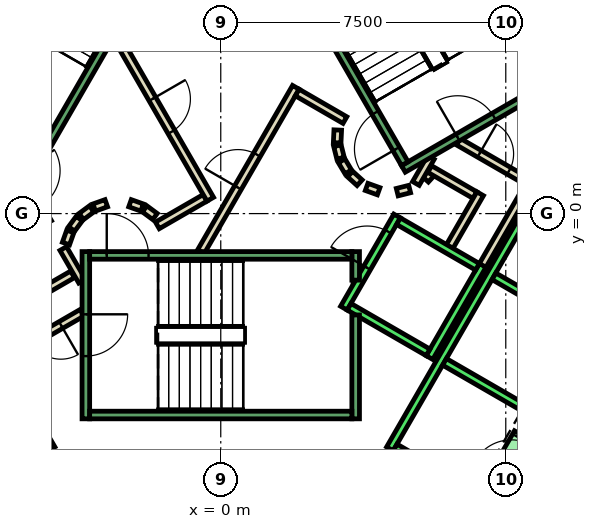
"""IFC4 building model, lengths in metres.
Left out: names, types, materials, properties, quantities, classifications, styles, units other than length and angle.
Written with IfcOpenShell. Run it as: python <this file> out.ifc"""

import sys

from ifc_helpers import new_model, si_unit, direction, frame, frame_2d, origin, place, context, subcontext, project, spatial, polyline, rectangle, outline, extrude, element, fill, save


model = new_model("IFC4")
c1 = context("Model", 3, precision=1e-05, world=origin(), true_north=direction((0.0, 1.0)))
c2 = subcontext(c1, "Body", "Model", "MODEL_VIEW")
j1 = project(units=[si_unit("LENGTHUNIT", "METRE"), si_unit("PLANEANGLEUNIT", "RADIAN")], contexts=[c1])
p1 = place(None, origin())
s1 = spatial("IfcSite", under=j1, at=p1, CompositionType="ELEMENT")
p2 = place(p1, origin())
s2 = spatial("IfcBuilding", under=s1, at=p2, CompositionType="ELEMENT")
p3 = place(p2, frame((0.0, 0.0, 9.0)))
s3 = spatial("IfcBuildingStorey", under=s2, at=p3, CompositionType="ELEMENT", Elevation=9.0)
p4 = place(p3, frame((0.0, 0.0, -0.45)))
e1 = element("IfcWall", 1, at=p4, inside=s3, PredefinedType="SHEAR", context=c2, shape_type="SweptSolid", body=[
    extrude(outline(polyline([(8.517, 11.748), (7.651, 11.248), (12.702, 2.5), (13.856, 2.5), (8.517, 11.748)])), origin(), (0.0, 0.0, 1.0), 6.0),
])
p5 = place(p3, frame((0.0, 0.0, 3.6)))
e2 = element("IfcWall", 2, at=p5, inside=s3, PredefinedType="SHEAR", context=c2, shape_type="SweptSolid", body=[
    extrude(outline(polyline([(8.767, -6.314), (7.902, -5.814), (7.252, -6.94), (8.117, -7.44), (8.767, -6.314)])), origin(), (0.0, 0.0, 1.0), 1.95),
])
p6 = place(p3, frame((5.39, 0.898, 0.0), z_axis=(0.0, 0.0, 1.0), x_axis=(0.673828488714, 0.738887791073, 0.0)))
e3 = element("IfcWall", 3, at=p6, inside=s3, PredefinedType="PARTITIONING", context=c2, shape_type="SweptSolid", body=[
    extrude(rectangle(XDim=0.263, YDim=0.2, at=frame_2d((0.131, 0.0))), origin(), (0.0, 0.0, 1.0), 5.55),
])
p7 = place(p3, frame((5.499, 1.172, 0.0), z_axis=(0.0, 0.0, 1.0), x_axis=(0.866333505267, -0.499465972466, 0.0)))
e4 = element("IfcWall", 4, at=p7, inside=s3, PredefinedType="PARTITIONING", context=c2, shape_type="SweptSolid", body=[
    extrude(rectangle(XDim=1.374, YDim=0.2, at=frame_2d((0.687, 0.0))), origin(), (0.0, 0.0, 1.0), 5.55),
])
p8 = place(p3, frame((6.826, 0.522, 0.0), z_axis=(0.0, 0.0, 1.0), x_axis=(-0.500016722714, -0.866015748706, 0.0)))
e5 = element("IfcWall", 5, at=p8, inside=s3, PredefinedType="PARTITIONING", context=c2, shape_type="SweptSolid", body=[
    extrude(rectangle(XDim=1.7, YDim=0.2, at=frame_2d((0.85, 0.0))), origin(), (0.0, 0.0, 1.0), 5.55),
])
p9 = place(p3, frame((8.192, 0.888, 0.0), z_axis=(0.0, 0.0, 1.0), x_axis=(-0.499940625693, -0.866059680843, 0.0)))
e6 = element("IfcWall", 6, at=p9, inside=s3, PredefinedType="PARTITIONING", context=c2, shape_type="SweptSolid", body=[
    extrude(rectangle(XDim=2.68, YDim=0.2, at=frame_2d((1.34, 0.0))), origin(), (0.0, 0.0, 1.0), 5.55),
])
p10 = place(p3, frame((5.135, 0.793, 0.0), z_axis=(0.0, 0.0, 1.0), x_axis=(0.499526442893, 0.866298639529, 0.0)))
e7 = element("IfcWall", 7, at=p10, inside=s3, PredefinedType="PARTITIONING", context=c2, shape_type="SweptSolid", body=[
    extrude(rectangle(XDim=0.791, YDim=0.2, at=frame_2d((0.396, 0.0))), origin(), (0.0, 0.0, 1.0), 5.55),
])
p11 = place(p3, frame((6.25, 1.894, 0.0), z_axis=(0.0, 0.0, 1.0), x_axis=(0.866043184279, -0.499969202016, 0.0)))
e8 = element("IfcWall", 8, at=p11, inside=s3, PredefinedType="PARTITIONING", context=c2, shape_type="SweptSolid", body=[
    extrude(rectangle(XDim=2.084, YDim=0.2, at=frame_2d((1.042, 0.0))), origin(), (0.0, 0.0, 1.0), 5.55),
])
p12 = place(p11, frame((0.642, 0.0, 0.0)))
e9 = element("IfcOpeningElement", 9, at=p12, cuts=e8, PredefinedType="OPENING", context=c2, shape_type="SweptSolid", body=[
    extrude(rectangle(XDim=0.9, YDim=2.1, at=frame_2d((0.45, 1.05))), frame((0.0, 0.11, 0.0), z_axis=(0.0, -1.0, 0.0), x_axis=(1.0, 0.0, 0.0)), (0.0, 0.0, 1.0), 0.22),
])
p13 = place(p3, frame((-3.9, -1.599, 0.0), z_axis=(0.0, 0.0, 1.0), x_axis=(-0.865969445389, -0.500096910261, 0.0)))
e10 = element("IfcWall", 10, at=p13, inside=s3, PredefinedType="PARTITIONING", context=c2, shape_type="SweptSolid", body=[
    extrude(rectangle(XDim=1.373, YDim=0.2, at=frame_2d((0.687, 0.0))), origin(), (0.0, 0.0, 1.0), 5.55),
])
p14 = place(p3, frame((-4.145, -0.92, 0.0), z_axis=(0.0, 0.0, 1.0), x_axis=(0.499743786207, -0.866173278362, 0.0)))
e11 = element("IfcWall", 11, at=p14, inside=s3, PredefinedType="PARTITIONING", context=c2, shape_type="SweptSolid", body=[
    extrude(rectangle(XDim=0.991, YDim=0.2, at=frame_2d((0.495, 0.0))), origin(), (0.0, 0.0, 1.0), 5.55),
])
p15 = place(p3, frame((-3.65, -2.61, 0.0), z_axis=(0.0, 0.0, 1.0), x_axis=(-0.866072462134, -0.499918483688, 0.0)))
e12 = element("IfcWall", 12, at=p15, inside=s3, PredefinedType="PARTITIONING", context=c2, shape_type="SweptSolid", body=[
    extrude(rectangle(XDim=2.084, YDim=0.2, at=frame_2d((1.042, 0.0))), origin(), (0.0, 0.0, 1.0), 5.55),
])
p16 = place(p15, frame((0.642, 0.0, 0.0)))
e13 = element("IfcOpeningElement", 13, at=p16, cuts=e12, PredefinedType="OPENING", context=c2, shape_type="SweptSolid", body=[
    extrude(rectangle(XDim=0.9, YDim=2.1, at=frame_2d((0.45, 1.05))), frame((0.0, 0.11, 0.0), z_axis=(0.0, -1.0, 0.0), x_axis=(1.0, 0.0, 0.0)), (0.0, 0.0, 1.0), 0.22),
])
p17 = place(p3, frame((3.079, 2.199, 0.0), z_axis=(0.0, 0.0, 1.0), x_axis=(-0.047771483479, -0.998858290933, 0.0)))
e14 = element("IfcWall", 14, at=p17, inside=s3, PredefinedType="PARTITIONING", context=c2, shape_type="SweptSolid", body=[
    extrude(rectangle(XDim=0.337, YDim=0.2, at=frame_2d((0.169, 0.0))), origin(), (0.0, 0.0, 1.0), 5.55),
])
p18 = place(p3, frame((3.07, 1.786, 0.0), z_axis=(0.0, 0.0, 1.0), x_axis=(0.242705583207, -0.970099994784, 0.0)))
e15 = element("IfcWall", 15, at=p18, inside=s3, PredefinedType="PARTITIONING", context=c2, shape_type="SweptSolid", body=[
    extrude(rectangle(XDim=0.338, YDim=0.2, at=frame_2d((0.169, 0.0))), origin(), (0.0, 0.0, 1.0), 5.55),
])
for number, where, z_axis, x_axis in (
    (16, (3.182, 1.388, 0.0), (0.0, 0.0, 1.0), (0.512, -0.859, 0.0)),
    (17, (3.404, 1.039, 0.0), (0.0, 0.0, 1.0), (0.74, -0.672, 0.0)),
):
    element("IfcWall", number, at=place(p3, frame(where, z_axis=z_axis, x_axis=x_axis)), inside=s3, PredefinedType="PARTITIONING", context=c2, shape_type="SweptSolid", body=[
        extrude(rectangle(XDim=0.338, YDim=0.2, at=frame_2d((0.169, 0.0))), origin(), (0.0, 0.0, 1.0), 5.55),
    ])
p19 = place(p3, frame((3.838, 0.702, 0.0), z_axis=(0.0, 0.0, 1.0), x_axis=(0.941035081519, -0.338308993895, 0.0)))
e18 = element("IfcWall", 18, at=p19, inside=s3, PredefinedType="PARTITIONING", context=c2, shape_type="SweptSolid", body=[
    extrude(rectangle(XDim=0.337, YDim=0.2, at=frame_2d((0.168, 0.0))), origin(), (0.0, 0.0, 1.0), 5.55),
])
p20 = place(p3, frame((4.644, 0.564, 0.0), z_axis=(0.0, 0.0, 1.0), x_axis=(0.969929076366, 0.243387729394, 0.0)))
e19 = element("IfcWall", 19, at=p20, inside=s3, PredefinedType="PARTITIONING", context=c2, shape_type="SweptSolid", body=[
    extrude(rectangle(XDim=0.337, YDim=0.2, at=frame_2d((0.168, 0.0))), origin(), (0.0, 0.0, 1.0), 5.55),
])
p21 = place(p3, frame((-0.52, -1.0, 0.0), z_axis=(0.0, 0.0, 1.0), x_axis=(0.50011622646, 0.865958290007, 0.0)))
e20 = element("IfcWall", 20, at=p21, inside=s3, PredefinedType="PARTITIONING", context=c2, shape_type="SweptSolid", body=[
    extrude(rectangle(XDim=4.991, YDim=0.2, at=frame_2d((2.496, 0.0))), origin(), (0.0, 0.0, 1.0), 5.55),
])
p22 = place(p21, frame((1.945, 0.0, 0.0)))
e21 = element("IfcOpeningElement", 21, at=p22, cuts=e20, PredefinedType="OPENING", context=c2, shape_type="SweptSolid", body=[
    extrude(rectangle(XDim=1.0, YDim=2.1, at=frame_2d((0.5, 1.05))), frame((0.0, 0.11, 0.0), z_axis=(0.0, -1.0, 0.0), x_axis=(1.0, 0.0, 0.0)), (0.0, 0.0, 1.0), 0.22),
])
p23 = place(p3, frame((2.012, 3.186, 0.0), z_axis=(0.0, 0.0, 1.0), x_axis=(0.865891012941, -0.500232699559, 0.0)))
e22 = element("IfcWall", 22, at=p23, inside=s3, PredefinedType="PARTITIONING", context=c2, shape_type="SweptSolid", body=[
    extrude(rectangle(XDim=1.449, YDim=0.2, at=frame_2d((0.725, 0.0))), origin(), (0.0, 0.0, 1.0), 5.55),
])
p24 = place(p3, frame((-0.412, 0.414, 0.0), z_axis=(0.0, 0.0, 1.0), x_axis=(-0.866017369001, -0.500013916395, 0.0)))
e23 = element("IfcWall", 23, at=p24, inside=s3, PredefinedType="PARTITIONING", context=c2, shape_type="SweptSolid", body=[
    extrude(rectangle(XDim=1.45, YDim=0.2, at=frame_2d((0.725, 0.0))), origin(), (0.0, 0.0, 1.0), 5.55),
])
p25 = place(p3, frame((-1.731, -0.077, 0.0), z_axis=(0.0, 0.0, 1.0), x_axis=(-0.804311165252, 0.594208338422, 0.0)))
e24 = element("IfcWall", 24, at=p25, inside=s3, PredefinedType="PARTITIONING", context=c2, shape_type="SweptSolid", body=[
    extrude(rectangle(XDim=0.338, YDim=0.2, at=frame_2d((0.169, 0.0))), origin(), (0.0, 0.0, 1.0), 5.55),
])
p26 = place(p3, frame((-2.07, 0.16, 0.0), z_axis=(0.0, 0.0, 1.0), x_axis=(-0.942199461132, 0.335052496547, 0.0)))
e25 = element("IfcWall", 25, at=p26, inside=s3, PredefinedType="PARTITIONING", context=c2, shape_type="SweptSolid", body=[
    extrude(rectangle(XDim=0.337, YDim=0.2, at=frame_2d((0.169, 0.0))), origin(), (0.0, 0.0, 1.0), 5.55),
])
p27 = place(p3, frame((-3.012, 0.273, 0.0), z_axis=(0.0, 0.0, 1.0), x_axis=(-0.942280615813, -0.334824194261, 0.0)))
e26 = element("IfcWall", 26, at=p27, inside=s3, PredefinedType="PARTITIONING", context=c2, shape_type="SweptSolid", body=[
    extrude(rectangle(XDim=0.338, YDim=0.2, at=frame_2d((0.169, 0.0))), origin(), (0.0, 0.0, 1.0), 5.55),
])
p28 = place(p3, frame((-3.397, 0.124, 0.0), z_axis=(0.0, 0.0, 1.0), x_axis=(-0.804311165252, -0.594208338422, 0.0)))
e27 = element("IfcWall", 27, at=p28, inside=s3, PredefinedType="PARTITIONING", context=c2, shape_type="SweptSolid", body=[
    extrude(rectangle(XDim=0.338, YDim=0.2, at=frame_2d((0.169, 0.0))), origin(), (0.0, 0.0, 1.0), 5.55),
])
p29 = place(p3, frame((-3.723, -0.131, 0.0), z_axis=(0.0, 0.0, 1.0), x_axis=(-0.594675113454, -0.803966112121, 0.0)))
e28 = element("IfcWall", 28, at=p29, inside=s3, PredefinedType="PARTITIONING", context=c2, shape_type="SweptSolid", body=[
    extrude(rectangle(XDim=0.338, YDim=0.2, at=frame_2d((0.169, 0.0))), origin(), (0.0, 0.0, 1.0), 5.55),
])
p30 = place(p3, frame((-3.96, -0.47, 0.0), z_axis=(0.0, 0.0, 1.0), x_axis=(-0.334824194261, -0.942280615813, 0.0)))
e29 = element("IfcWall", 29, at=p30, inside=s3, PredefinedType="PARTITIONING", context=c2, shape_type="SweptSolid", body=[
    extrude(rectangle(XDim=0.338, YDim=0.2, at=frame_2d((0.169, 0.0))), origin(), (0.0, 0.0, 1.0), 5.55),
])
p31 = place(p3, frame((-2.771, 4.7, 0.0), z_axis=(0.0, 0.0, 1.0), x_axis=(0.499969479948, -0.866043023828, 0.0)))
e30 = element("IfcWall", 30, at=p31, inside=s3, PredefinedType="PARTITIONING", context=c2, shape_type="SweptSolid", body=[
    extrude(rectangle(XDim=4.99, YDim=0.2, at=frame_2d((2.495, 0.0))), origin(), (0.0, 0.0, 1.0), 5.55),
])
p32 = place(p31, frame((1.945, 0.0, 0.0)))
e31 = element("IfcOpeningElement", 31, at=p32, cuts=e30, PredefinedType="OPENING", context=c2, shape_type="SweptSolid", body=[
    extrude(rectangle(XDim=1.0, YDim=2.1, at=frame_2d((0.5, 1.05))), frame((0.0, 0.11, 0.0), z_axis=(0.0, -1.0, 0.0), x_axis=(1.0, 0.0, 0.0)), (0.0, 0.0, 1.0), 0.22),
])
p33 = place(p3, frame((-9.751, 2.99, 0.0), z_axis=(0.0, 0.0, 1.0), x_axis=(0.50000090737, -0.866024879913, 0.0)))
e32 = element("IfcWall", 32, at=p33, inside=s3, PredefinedType="STANDARD", context=c2, shape_type="SweptSolid", body=[
    extrude(rectangle(XDim=10.6, YDim=0.2, at=frame_2d((5.3, 0.0))), origin(), (0.0, 0.0, 1.0), 5.55),
])
p34 = place(p3, frame((3.24, -2.488, 0.0), z_axis=(0.0, 0.0, 1.0), x_axis=(0.49994636267, 0.866056369097, 0.0)))
e33 = element("IfcWall", 33, at=p34, inside=s3, PredefinedType="STANDARD", context=c2, shape_type="SweptSolid", body=[
    extrude(rectangle(XDim=2.8, YDim=0.2, at=frame_2d((1.4, 0.0))), origin(), (0.0, 0.0, 1.0), 5.55),
])
p35 = place(p34, frame((1.225, 0.0, 0.0)))
e34 = element("IfcOpeningElement", 34, at=p35, cuts=e33, PredefinedType="OPENING", context=c2, shape_type="SweptSolid", body=[
    extrude(rectangle(XDim=1.1, YDim=2.1, at=frame_2d((0.55, 1.05))), frame((0.0, 0.11, 0.0), z_axis=(0.0, -1.0, 0.0), x_axis=(1.0, 0.0, 0.0)), (0.0, 0.0, 1.0), 0.22),
])
p36 = place(p3, frame((5.492, -3.788, 0.0), z_axis=(0.0, 0.0, 1.0), x_axis=(0.500011755427, 0.866018616679, 0.0)))
e35 = element("IfcWall", 35, at=p36, inside=s3, PredefinedType="STANDARD", context=c2, shape_type="SweptSolid", body=[
    extrude(rectangle(XDim=2.8, YDim=0.2, at=frame_2d((1.4, 0.0))), origin(), (0.0, 0.0, 1.0), 5.55),
])
p37 = place(p3, frame((3.377, -2.452, 0.0), z_axis=(0.0, 0.0, 1.0), x_axis=(0.865955154139, -0.50012165622, 0.0)))
e36 = element("IfcWall", 36, at=p37, inside=s3, PredefinedType="STANDARD", context=c2, shape_type="SweptSolid", body=[
    extrude(rectangle(XDim=2.4, YDim=0.2, at=frame_2d((1.2, 0.0))), origin(), (0.0, 0.0, 1.0), 5.55),
])
p38 = place(p3, frame((4.677, -0.2, 0.0), z_axis=(0.0, 0.0, 1.0), x_axis=(0.865973769406, -0.500089422704, 0.0)))
e37 = element("IfcWall", 37, at=p38, inside=s3, PredefinedType="STANDARD", context=c2, shape_type="SweptSolid", body=[
    extrude(rectangle(XDim=2.399, YDim=0.2, at=frame_2d((1.2, 0.0))), origin(), (0.0, 0.0, 1.0), 5.55),
])
p39 = place(p3, frame((4.451, -6.19, 0.0), z_axis=(0.0, 0.0, 1.0), x_axis=(0.50000090737, 0.866024879913, 0.0)))
e38 = element("IfcWall", 38, at=p39, inside=s3, PredefinedType="STANDARD", context=c2, shape_type="SweptSolid", body=[
    extrude(rectangle(XDim=10.6, YDim=0.2, at=frame_2d((5.3, 0.0))), origin(), (0.0, 0.0, 1.0), 5.55),
])
for number, where, z_axis, x_axis in (
    (39, (4.588, -6.153, 0.0), (0.0, 0.0, 1.0), (0.866, -0.5, 0.0)),
    (40, (5.888, -3.902, 0.0), (0.0, 0.0, 1.0), (0.866, -0.5, 0.0)),
    (41, (7.188, -1.65, 0.0), (0.0, 0.0, 1.0), (0.866, -0.5, 0.0)),
):
    element("IfcWall", number, at=place(p3, frame(where, z_axis=z_axis, x_axis=x_axis)), inside=s3, PredefinedType="STANDARD", context=c2, shape_type="SweptSolid", body=[
        extrude(rectangle(XDim=2.5, YDim=0.2, at=frame_2d((1.25, 0.0))), origin(), (0.0, 0.0, 1.0), 5.55),
    ])
p40 = place(p3, frame((7.598, -7.14, 0.0), z_axis=(0.0, 0.0, 1.0), x_axis=(0.500362116554, 0.865816234728, 0.0)))
e42 = element("IfcWall", 42, at=p40, inside=s3, PredefinedType="STANDARD", context=c2, shape_type="SweptSolid", body=[
    extrude(rectangle(XDim=1.299, YDim=1.2, at=frame_2d((0.65, 0.0))), origin(), (0.0, 0.0, 1.0), 2.4),
])
p41 = place(p40, frame((0.1, 0.0, 0.0)))
e43 = element("IfcOpeningElement", 43, at=p41, cuts=e42, PredefinedType="OPENING", context=c2, shape_type="SweptSolid", body=[
    extrude(rectangle(XDim=1.1, YDim=2.3, at=frame_2d((0.55, 1.15))), frame((0.0, 0.61, 0.0), z_axis=(0.0, -1.0, 0.0), x_axis=(1.0, 0.0, 0.0)), (0.0, 0.0, 1.0), 1.22),
])
p42 = place(p3, frame((-3.55, -1.0, 0.0), z_axis=(0.0, 0.0, 1.0), x_axis=(0.0, -1.0, 0.0)))
e44 = element("IfcWall", 44, at=p42, inside=s3, PredefinedType="STANDARD", context=c2, shape_type="SweptSolid", body=[
    extrude(rectangle(XDim=4.4, YDim=0.2, at=frame_2d((2.2, 0.0))), origin(), (0.0, 0.0, 1.0), 5.55),
])
p43 = place(p42, frame((1.65, 0.0, 0.0)))
e45 = element("IfcOpeningElement", 45, at=p43, cuts=e44, PredefinedType="OPENING", context=c2, shape_type="SweptSolid", body=[
    extrude(rectangle(XDim=1.1, YDim=2.2, at=frame_2d((0.55, 1.1))), frame((0.0, 0.11, 0.0), z_axis=(0.0, -1.0, 0.0), x_axis=(1.0, 0.0, 0.0)), (0.0, 0.0, 1.0), 0.22),
])
p44 = place(p3, frame((3.55, -2.667, 0.0), z_axis=(0.0, 0.0, 1.0), x_axis=(0.0, -1.0, 0.0)))
e46 = element("IfcWall", 46, at=p44, inside=s3, PredefinedType="STANDARD", context=c2, shape_type="SweptSolid", body=[
    extrude(rectangle(XDim=2.733, YDim=0.2, at=frame_2d((1.366, 0.0))), origin(), (0.0, 0.0, 1.0), 5.55),
])
p45 = place(p3, frame((3.55, -1.0, 0.0), z_axis=(0.0, 0.0, 1.0), x_axis=(0.0, -1.0, 0.0)))
e47 = element("IfcWall", 47, at=p45, inside=s3, PredefinedType="STANDARD", context=c2, shape_type="SweptSolid", body=[
    extrude(rectangle(XDim=0.751, YDim=0.2, at=frame_2d((0.375, 0.0))), origin(), (0.0, 0.0, 1.0), 5.55),
])
p46 = place(p3, frame((-3.45, -1.1, 0.0), z_axis=(0.0, 0.0, 1.0), x_axis=(1.0, 0.0, 0.0)))
e48 = element("IfcWall", 48, at=p46, inside=s3, PredefinedType="STANDARD", context=c2, shape_type="SweptSolid", body=[
    extrude(rectangle(XDim=6.9, YDim=0.2, at=frame_2d((3.45, 0.0))), origin(), (0.0, 0.0, 1.0), 5.55),
])
p47 = place(p46, frame((0.45, 0.0, 0.0)))
e49 = element("IfcOpeningElement", 49, at=p47, cuts=e48, PredefinedType="OPENING", context=c2, shape_type="SweptSolid", body=[
    extrude(rectangle(XDim=1.1, YDim=2.2, at=frame_2d((0.55, 1.1))), frame((0.0, 0.11, 0.0), z_axis=(0.0, -1.0, 0.0), x_axis=(1.0, 0.0, 0.0)), (0.0, 0.0, 1.0), 0.22),
])
p48 = place(p3, frame((-3.45, -5.3, 0.0), z_axis=(0.0, 0.0, 1.0), x_axis=(1.0, 0.0, 0.0)))
e50 = element("IfcWall", 50, at=p48, inside=s3, PredefinedType="STANDARD", context=c2, shape_type="SweptSolid", body=[
    extrude(rectangle(XDim=6.9, YDim=0.2, at=frame_2d((3.45, 0.0))), origin(), (0.0, 0.0, 1.0), 5.55),
])
p49 = place(p3, frame((4.806, 1.176, 0.0), z_axis=(0.0, 0.0, 1.0), x_axis=(0.866059941101, 0.499940174841, 0.0)))
e51 = element("IfcWall", 51, at=p49, inside=s3, PredefinedType="STANDARD", context=c2, shape_type="SweptSolid", body=[
    extrude(rectangle(XDim=4.4, YDim=0.2, at=frame_2d((2.2, 0.0))), origin(), (0.0, 0.0, 1.0), 5.55),
])
p50 = place(p49, frame((1.65, 0.0, 0.0)))
e52 = element("IfcOpeningElement", 52, at=p50, cuts=e51, PredefinedType="OPENING", context=c2, shape_type="SweptSolid", body=[
    extrude(rectangle(XDim=1.1, YDim=2.2, at=frame_2d((0.55, 1.1))), frame((0.0, 0.11, 0.0), z_axis=(0.0, -1.0, 0.0), x_axis=(1.0, 0.0, 0.0)), (0.0, 0.0, 1.0), 0.22),
])
p51 = place(p3, frame((4.843, 1.312, 0.0), z_axis=(0.0, 0.0, 1.0), x_axis=(-0.499963383562, 0.866046543262, 0.0)))
e53 = element("IfcWall", 53, at=p51, inside=s3, PredefinedType="STANDARD", context=c2, shape_type="SweptSolid", body=[
    extrude(rectangle(XDim=6.9, YDim=0.2, at=frame_2d((3.45, 0.0))), origin(), (0.0, 0.0, 1.0), 5.55),
])
p52 = place(p51, frame((0.45, 0.0, 0.0)))
e54 = element("IfcOpeningElement", 54, at=p52, cuts=e53, PredefinedType="OPENING", context=c2, shape_type="SweptSolid", body=[
    extrude(rectangle(XDim=1.1, YDim=2.2, at=frame_2d((0.55, 1.1))), frame((0.0, 0.11, 0.0), z_axis=(0.0, -1.0, 0.0), x_axis=(1.0, 0.0, 0.0)), (0.0, 0.0, 1.0), 0.22),
])
p53 = place(p3, frame((8.48, 3.412, 0.0), z_axis=(0.0, 0.0, 1.0), x_axis=(-0.499978703459, 0.866037698999, 0.0)))
e55 = element("IfcWall", 55, at=p53, inside=s3, PredefinedType="STANDARD", context=c2, shape_type="SweptSolid", body=[
    extrude(rectangle(XDim=6.9, YDim=0.2, at=frame_2d((3.45, 0.0))), origin(), (0.0, 0.0, 1.0), 5.55),
])
p54 = place(p3, frame((-1.393, 7.288, 0.0), z_axis=(0.0, 0.0, 1.0), x_axis=(-0.499963383562, -0.866046543262, 0.0)))
e56 = element("IfcWall", 56, at=p54, inside=s3, PredefinedType="STANDARD", context=c2, shape_type="SweptSolid", body=[
    extrude(rectangle(XDim=6.9, YDim=0.2, at=frame_2d((3.45, 0.0))), origin(), (0.0, 0.0, 1.0), 5.55),
])
p55 = place(p54, frame((0.45, 0.0, 0.0)))
e57 = element("IfcOpeningElement", 57, at=p55, cuts=e56, PredefinedType="OPENING", context=c2, shape_type="SweptSolid", body=[
    extrude(rectangle(XDim=1.1, YDim=2.2, at=frame_2d((0.55, 1.1))), frame((0.0, 0.11, 0.0), z_axis=(0.0, -1.0, 0.0), x_axis=(1.0, 0.0, 0.0)), (0.0, 0.0, 1.0), 0.22),
])
p56 = place(p22, origin())
e58 = element("IfcDoor", 58, at=p56, inside=s3, OperationType="SINGLE_SWING_LEFT", PredefinedType="DOOR", context=c2, shape_type="SweptSolid", body=[
    extrude(rectangle(XDim=1.0, YDim=2.1, at=frame_2d((0.5, 1.05))), frame((0.0, 0.025, 0.0), z_axis=(0.0, -1.0, 0.0), x_axis=(1.0, 0.0, 0.0)), (0.0, 0.0, 1.0), 0.05),
])
fill(e21, e58)
p57 = place(p32, origin())
e59 = element("IfcDoor", 59, at=p57, inside=s3, OperationType="SINGLE_SWING_RIGHT", PredefinedType="DOOR", context=c2, shape_type="SweptSolid", body=[
    extrude(rectangle(XDim=1.0, YDim=2.1, at=frame_2d((0.5, 1.05))), frame((0.0, 0.025, 0.0), z_axis=(0.0, -1.0, 0.0), x_axis=(1.0, 0.0, 0.0)), (0.0, 0.0, 1.0), 0.05),
])
fill(e31, e59)
p58 = place(p12, origin())
e60 = element("IfcDoor", 60, at=p58, inside=s3, OperationType="SINGLE_SWING_LEFT", PredefinedType="DOOR", context=c2, shape_type="SweptSolid", body=[
    extrude(rectangle(XDim=0.9, YDim=2.1, at=frame_2d((0.45, 1.05))), frame((0.0, 0.025, 0.0), z_axis=(0.0, -1.0, 0.0), x_axis=(1.0, 0.0, 0.0)), (0.0, 0.0, 1.0), 0.05),
])
fill(e9, e60)
p59 = place(p16, origin())
e61 = element("IfcDoor", 61, at=p59, inside=s3, OperationType="SINGLE_SWING_LEFT", PredefinedType="DOOR", context=c2, shape_type="SweptSolid", body=[
    extrude(rectangle(XDim=0.9, YDim=2.1, at=frame_2d((0.45, 1.05))), frame((0.0, 0.025, 0.0), z_axis=(0.0, -1.0, 0.0), x_axis=(1.0, 0.0, 0.0)), (0.0, 0.0, 1.0), 0.05),
])
fill(e13, e61)
p60 = place(p41, origin())
e62 = element("IfcDoor", 62, at=p60, inside=s3, OperationType="SLIDING_TO_LEFT", PredefinedType="DOOR", context=c2, shape_type="SweptSolid", body=[
    extrude(rectangle(XDim=1.1, YDim=2.3, at=frame_2d((0.55, 1.15))), frame((0.0, 0.025, 0.0), z_axis=(0.0, -1.0, 0.0), x_axis=(1.0, 0.0, 0.0)), (0.0, 0.0, 1.0), 0.05),
])
fill(e43, e62)
p61 = place(p35, origin())
e63 = element("IfcDoor", 63, at=p61, inside=s3, OperationType="SLIDING_TO_LEFT", PredefinedType="DOOR", context=c2, shape_type="SweptSolid", body=[
    extrude(rectangle(XDim=1.1, YDim=2.1, at=frame_2d((0.55, 1.05))), frame((0.0, 0.025, 0.0), z_axis=(0.0, -1.0, 0.0), x_axis=(1.0, 0.0, 0.0)), (0.0, 0.0, 1.0), 0.05),
])
fill(e34, e63)
p62 = place(p47, origin())
e64 = element("IfcDoor", 64, at=p62, inside=s3, OperationType="SINGLE_SWING_LEFT", PredefinedType="DOOR", context=c2, shape_type="SweptSolid", body=[
    extrude(rectangle(XDim=1.1, YDim=2.2, at=frame_2d((0.55, 1.1))), frame((0.0, 0.025, 0.0), z_axis=(0.0, -1.0, 0.0), x_axis=(1.0, 0.0, 0.0)), (0.0, 0.0, 1.0), 0.05),
])
fill(e49, e64)
p63 = place(p43, origin())
e65 = element("IfcDoor", 65, at=p63, inside=s3, OperationType="SINGLE_SWING_LEFT", PredefinedType="DOOR", context=c2, shape_type="SweptSolid", body=[
    extrude(rectangle(XDim=1.1, YDim=2.2, at=frame_2d((0.55, 1.1))), frame((0.0, 0.025, 0.0), z_axis=(0.0, -1.0, 0.0), x_axis=(1.0, 0.0, 0.0)), (0.0, 0.0, 1.0), 0.05),
])
fill(e45, e65)
p64 = place(p52, origin())
e66 = element("IfcDoor", 66, at=p64, inside=s3, OperationType="SINGLE_SWING_LEFT", PredefinedType="DOOR", context=c2, shape_type="SweptSolid", body=[
    extrude(rectangle(XDim=1.1, YDim=2.2, at=frame_2d((0.55, 1.1))), frame((0.0, 0.025, 0.0), z_axis=(0.0, -1.0, 0.0), x_axis=(1.0, 0.0, 0.0)), (0.0, 0.0, 1.0), 0.05),
])
fill(e54, e66)
p65 = place(p50, origin())
e67 = element("IfcDoor", 67, at=p65, inside=s3, OperationType="SINGLE_SWING_LEFT", PredefinedType="DOOR", context=c2, shape_type="SweptSolid", body=[
    extrude(rectangle(XDim=1.1, YDim=2.2, at=frame_2d((0.55, 1.1))), frame((0.0, 0.025, 0.0), z_axis=(0.0, -1.0, 0.0), x_axis=(1.0, 0.0, 0.0)), (0.0, 0.0, 1.0), 0.05),
])
fill(e52, e67)
save(model, sys.argv[1])
